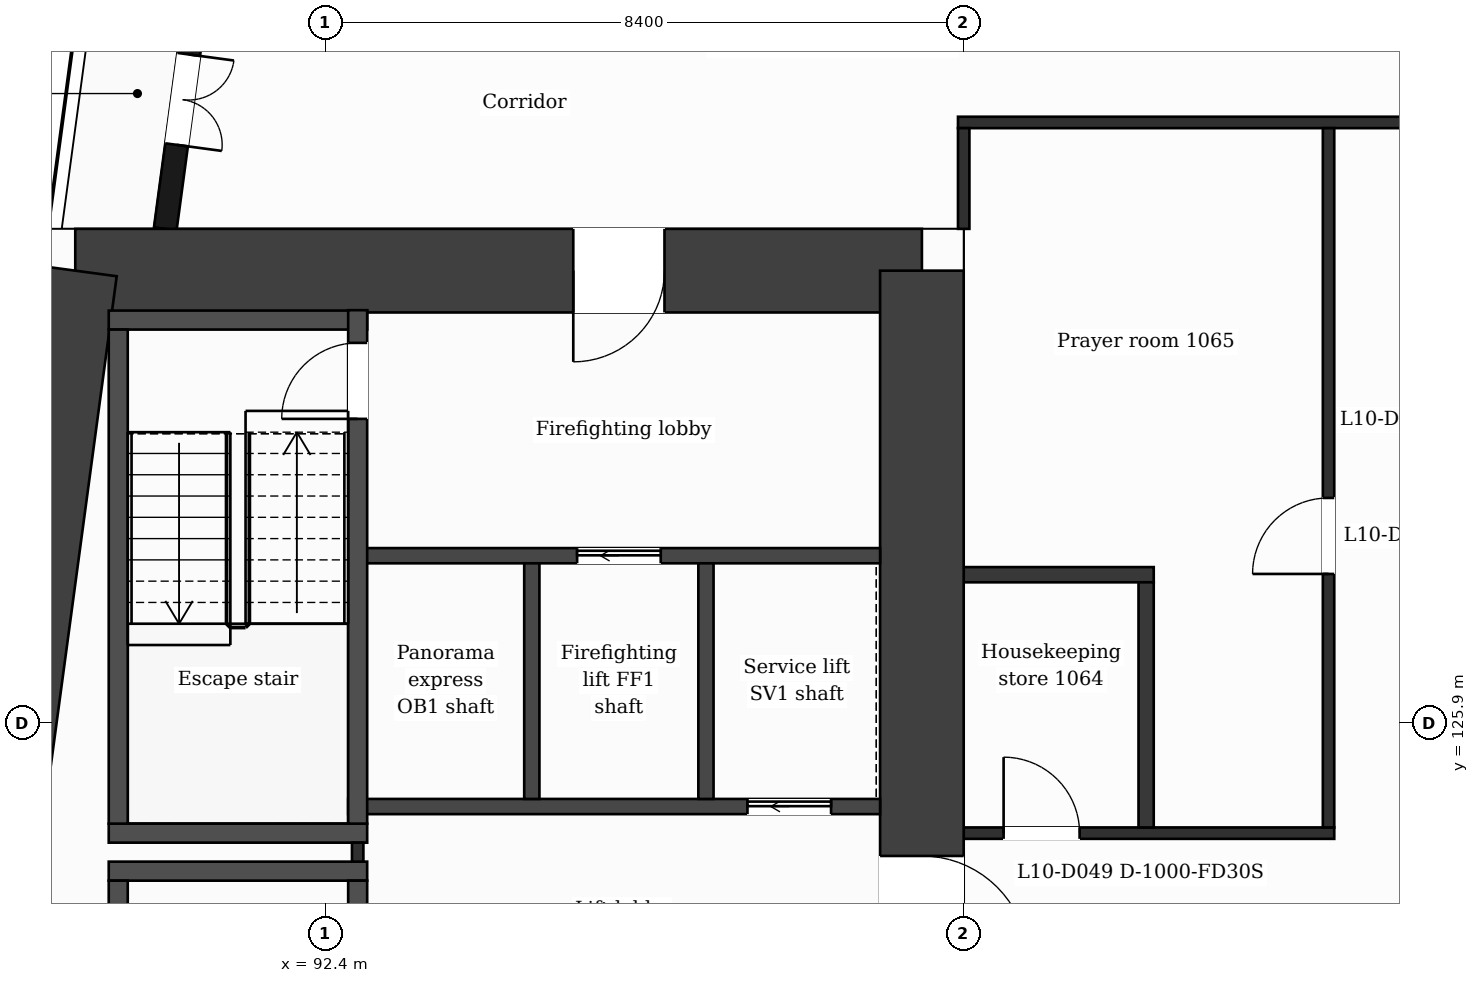
"""IFC4 building model, lengths in metres.
Left out: names, types, materials, properties, quantities, classifications, styles, units other than length and angle.
Written with IfcOpenShell. Run it as: python <this file> out.ifc"""

import sys

from ifc_helpers import new_model, si_unit, direction, frame, frame_2d, origin, place, context, subcontext, project, spatial, rectangle, extrude, element, fill, save


model = new_model("IFC4")
c1 = context("Model", 3, precision=1e-05, world=origin(), true_north=direction((0.0, 1.0)))
c2 = subcontext(c1, "Body", "Model", "MODEL_VIEW")
j1 = project(units=[si_unit("LENGTHUNIT", "METRE"), si_unit("PLANEANGLEUNIT", "RADIAN")], contexts=[c1])
p1 = place(None, origin())
s1 = spatial("IfcSite", under=j1, at=p1, CompositionType="ELEMENT")
p2 = place(p1, origin())
s2 = spatial("IfcBuilding", under=s1, at=p2, CompositionType="ELEMENT")
p3 = place(p2, frame((0.0, 0.0, 53.0)))
s3 = spatial("IfcBuildingStorey", under=s2, at=p3, CompositionType="ELEMENT", Elevation=53.0)
p4 = place(p3, frame((89.112, 131.85, 0.0), z_axis=(0.0, 0.0, 1.0), x_axis=(1.0, 0.0, 0.0)))
e1 = element("IfcWall", 1, at=p4, inside=s3, PredefinedType="SHEAR", context=c2, shape_type="SweptSolid", body=[
    extrude(rectangle(XDim=11.138, YDim=1.1, at=frame_2d((5.569, 0.0))), origin(), (0.0, 0.0, 1.0), 3.5),
])
p5 = place(p4, frame((6.552, 0.0, 0.0)))
e2 = element("IfcOpeningElement", 2, at=p5, cuts=e1, PredefinedType="OPENING", context=c2, shape_type="SweptSolid", body=[
    extrude(rectangle(XDim=1.2, YDim=2.1, at=frame_2d((0.6, 1.05))), frame((0.0, 0.56, 0.0), z_axis=(0.0, -1.0, 0.0), x_axis=(1.0, 0.0, 0.0)), (0.0, 0.0, 1.0), 1.12),
])
p6 = place(p3, frame((100.25, 131.85, 0.0), z_axis=(0.0, 0.0, 1.0), x_axis=(0.0, -1.0, 0.0)))
e3 = element("IfcWall", 3, at=p6, inside=s3, PredefinedType="SHEAR", context=c2, shape_type="SweptSolid", body=[
    extrude(rectangle(XDim=20.9, YDim=1.1, at=frame_2d((10.45, 0.0))), origin(), (0.0, 0.0, 1.0), 3.5),
])
p7 = place(p6, frame((7.7, 0.0, 0.0)))
e4 = element("IfcOpeningElement", 4, at=p7, cuts=e3, PredefinedType="OPENING", context=c2, shape_type="SweptSolid", body=[
    extrude(rectangle(XDim=1.4, YDim=2.1, at=frame_2d((0.7, 1.05))), frame((0.0, 0.56, 0.0), z_axis=(0.0, -1.0, 0.0), x_axis=(1.0, 0.0, 0.0)), (0.0, 0.0, 1.0), 1.12),
])
p8 = place(p3, frame((86.298, 110.95, 0.0), z_axis=(0.0, 0.0, 1.0), x_axis=(0.133400422634, 0.99106222168, 0.0)))
e5 = element("IfcWall", 5, at=p8, inside=s3, PredefinedType="SHEAR", context=c2, shape_type="SweptSolid", body=[
    extrude(rectangle(XDim=21.089, YDim=1.1, at=frame_2d((10.544, 0.0))), origin(), (0.0, 0.0, 1.0), 3.5),
])
p9 = place(p3, frame((91.177, 138.95, 0.0), z_axis=(0.0, 0.0, 1.0), x_axis=(-0.133426664613, -0.991058689065, 0.0)))
e6 = element("IfcWall", 6, at=p9, inside=s3, PredefinedType="SOLIDWALL", context=c2, shape_type="SweptSolid", body=[
    extrude(rectangle(XDim=6.609, YDim=0.3, at=frame_2d((3.305, 0.0))), origin(), (0.0, 0.0, 1.0), 3.18),
])
p10 = place(p9, frame((1.039, 0.0, 0.9)))
e7 = element("IfcOpeningElement", 7, at=p10, cuts=e6, PredefinedType="OPENING", context=c2, shape_type="SweptSolid", body=[
    extrude(rectangle(XDim=1.2, YDim=2.1, at=frame_2d((0.6, 1.05))), frame((0.0, 0.16, 0.0), z_axis=(0.0, -1.0, 0.0), x_axis=(1.0, 0.0, 0.0)), (0.0, 0.0, 1.0), 0.32),
])
p11 = place(p9, frame((4.294, 0.0, 0.0)))
e8 = element("IfcOpeningElement", 8, at=p11, cuts=e6, PredefinedType="OPENING", context=c2, shape_type="SweptSolid", body=[
    extrude(rectangle(XDim=1.2, YDim=2.4, at=frame_2d((0.6, 1.2))), frame((0.0, 0.16, 0.0), z_axis=(0.0, -1.0, 0.0), x_axis=(1.0, 0.0, 0.0)), (0.0, 0.0, 1.0), 0.32),
])
for number, where, z_axis, x_axis in (
    (9, (89.552, 123.95, 0.0), (0.0, 0.0, 1.0), (1.0, 0.0, 0.0)),
    (10, (89.552, 124.45, 0.0), (0.0, 0.0, 1.0), (1.0, 0.0, 0.0)),
):
    element("IfcWall", number, at=place(p3, frame(where, z_axis=z_axis, x_axis=x_axis)), inside=s3, PredefinedType="PARTITIONING", context=c2, shape_type="SweptSolid", body=[
        extrude(rectangle(XDim=3.4, YDim=0.25, at=frame_2d((1.7, 0.0))), origin(), (0.0, 0.0, 1.0), 3.18),
    ])
p12 = place(p3, frame((100.8, 124.45, 0.0), z_axis=(0.0, 0.0, 1.0), x_axis=(1.0, 0.0, 0.0)))
e11 = element("IfcWall", 11, at=p12, inside=s3, PredefinedType="PARTITIONING", context=c2, shape_type="SweptSolid", body=[
    extrude(rectangle(XDim=4.875, YDim=0.15, at=frame_2d((2.438, 0.0))), origin(), (0.0, 0.0, 1.0), 3.18),
])
p13 = place(p12, frame((0.525, 0.0, 0.0)))
e12 = element("IfcOpeningElement", 12, at=p13, cuts=e11, PredefinedType="OPENING", context=c2, shape_type="SweptSolid", body=[
    extrude(rectangle(XDim=1.0, YDim=2.1, at=frame_2d((0.5, 1.05))), frame((0.0, 0.085, 0.0), z_axis=(0.0, -1.0, 0.0), x_axis=(1.0, 0.0, 0.0)), (0.0, 0.0, 1.0), 0.17),
])
p14 = place(p3, frame((92.702, 124.8, 0.0), z_axis=(0.0, 0.0, 1.0), x_axis=(1.0, 0.0, 0.0)))
e13 = element("IfcWall", 13, at=p14, inside=s3, PredefinedType="PARTITIONING", context=c2, shape_type="SweptSolid", body=[
    extrude(rectangle(XDim=6.998, YDim=0.2, at=frame_2d((3.499, 0.0))), origin(), (0.0, 0.0, 1.0), 3.18),
])
p15 = place(p14, frame((5.253, 0.0, 0.0)))
e14 = element("IfcOpeningElement", 14, at=p15, cuts=e13, PredefinedType="OPENING", context=c2, shape_type="SweptSolid", body=[
    extrude(rectangle(XDim=1.1, YDim=2.1, at=frame_2d((0.55, 1.05))), frame((0.0, 0.11, 0.0), z_axis=(0.0, -1.0, 0.0), x_axis=(1.0, 0.0, 0.0)), (0.0, 0.0, 1.0), 0.22),
])
p16 = place(p3, frame((100.8, 127.85, 0.0), z_axis=(0.0, 0.0, 1.0), x_axis=(1.0, 0.0, 0.0)))
e15 = element("IfcWall", 15, at=p16, inside=s3, PredefinedType="PARTITIONING", context=c2, shape_type="SweptSolid", body=[
    extrude(rectangle(XDim=2.5, YDim=0.2, at=frame_2d((1.25, 0.0))), origin(), (0.0, 0.0, 1.0), 3.18),
])
p17 = place(p3, frame((92.827, 128.1, 0.0), z_axis=(0.0, 0.0, 1.0), x_axis=(1.0, 0.0, 0.0)))
e16 = element("IfcWall", 16, at=p17, inside=s3, PredefinedType="PARTITIONING", context=c2, shape_type="SweptSolid", body=[
    extrude(rectangle(XDim=6.873, YDim=0.2, at=frame_2d((3.437, 0.0))), origin(), (0.0, 0.0, 1.0), 3.18),
])
p18 = place(p17, frame((2.887, 0.0, 0.0)))
e17 = element("IfcOpeningElement", 17, at=p18, cuts=e16, PredefinedType="OPENING", context=c2, shape_type="SweptSolid", body=[
    extrude(rectangle(XDim=1.1, YDim=2.1, at=frame_2d((0.55, 1.05))), frame((0.0, 0.11, 0.0), z_axis=(0.0, -1.0, 0.0), x_axis=(1.0, 0.0, 0.0)), (0.0, 0.0, 1.0), 0.22),
])
p19 = place(p3, frame((89.552, 131.2, 0.0), z_axis=(0.0, 0.0, 1.0), x_axis=(1.0, 0.0, 0.0)))
e18 = element("IfcWall", 18, at=p19, inside=s3, PredefinedType="PARTITIONING", context=c2, shape_type="SweptSolid", body=[
    extrude(rectangle(XDim=3.4, YDim=0.25, at=frame_2d((1.7, 0.0))), origin(), (0.0, 0.0, 1.0), 3.18),
])
p20 = place(p3, frame((100.725, 133.8, 0.0), z_axis=(0.0, 0.0, 1.0), x_axis=(1.0, 0.0, 0.0)))
e19 = element("IfcWall", 19, at=p20, inside=s3, PredefinedType="PARTITIONING", context=c2, shape_type="SweptSolid", body=[
    extrude(rectangle(XDim=25.35, YDim=0.15, at=frame_2d((12.675, 0.0))), origin(), (0.0, 0.0, 1.0), 3.18),
])
p21 = place(p3, frame((89.677, 117.07, 0.0), z_axis=(0.0, 0.0, 1.0), x_axis=(0.0, 1.0, 0.0)))
e20 = element("IfcWall", 20, at=p21, inside=s3, PredefinedType="PARTITIONING", context=c2, shape_type="SweptSolid", body=[
    extrude(rectangle(XDim=6.755, YDim=0.25, at=frame_2d((3.377, 0.0))), origin(), (0.0, 0.0, 1.0), 3.18),
])
p22 = place(p3, frame((89.677, 124.575, 0.0), z_axis=(0.0, 0.0, 1.0), x_axis=(0.0, 1.0, 0.0)))
e21 = element("IfcWall", 21, at=p22, inside=s3, PredefinedType="PARTITIONING", context=c2, shape_type="SweptSolid", body=[
    extrude(rectangle(XDim=6.5, YDim=0.25, at=frame_2d((3.25, 0.0))), origin(), (0.0, 0.0, 1.0), 3.18),
])
p23 = place(p3, frame((92.827, 124.075, 0.0), z_axis=(0.0, 0.0, 1.0), x_axis=(0.0, 1.0, 0.0)))
e22 = element("IfcWall", 22, at=p23, inside=s3, PredefinedType="PARTITIONING", context=c2, shape_type="SweptSolid", body=[
    extrude(rectangle(XDim=0.25, YDim=0.15, at=frame_2d((0.125, 0.0))), origin(), (0.0, 0.0, 1.0), 3.18),
])
p24 = place(p3, frame((92.827, 117.07, 0.0), z_axis=(0.0, 0.0, 1.0), x_axis=(0.0, 1.0, 0.0)))
e23 = element("IfcWall", 23, at=p24, inside=s3, PredefinedType="PARTITIONING", context=c2, shape_type="SweptSolid", body=[
    extrude(rectangle(XDim=6.755, YDim=0.25, at=frame_2d((3.377, 0.0))), origin(), (0.0, 0.0, 1.0), 3.18),
])
p25 = place(p24, frame((5.455, 0.0, 0.0)))
e24 = element("IfcOpeningElement", 24, at=p25, cuts=e23, PredefinedType="OPENING", context=c2, shape_type="SweptSolid", body=[
    extrude(rectangle(XDim=0.95, YDim=2.1, at=frame_2d((0.475, 1.05))), frame((0.0, 0.135, 0.0), z_axis=(0.0, -1.0, 0.0), x_axis=(1.0, 0.0, 0.0)), (0.0, 0.0, 1.0), 0.27),
])
p26 = place(p3, frame((92.827, 124.575, 0.0), z_axis=(0.0, 0.0, 1.0), x_axis=(0.0, 1.0, 0.0)))
e25 = element("IfcWall", 25, at=p26, inside=s3, PredefinedType="PARTITIONING", context=c2, shape_type="SweptSolid", body=[
    extrude(rectangle(XDim=6.755, YDim=0.25, at=frame_2d((3.377, 0.0))), origin(), (0.0, 0.0, 1.0), 3.18),
])
p27 = place(p26, frame((5.325, 0.0, 0.0)))
e26 = element("IfcOpeningElement", 26, at=p27, cuts=e25, PredefinedType="OPENING", context=c2, shape_type="SweptSolid", body=[
    extrude(rectangle(XDim=1.0, YDim=2.1, at=frame_2d((0.5, 1.05))), frame((0.0, 0.135, 0.0), z_axis=(0.0, -1.0, 0.0), x_axis=(1.0, 0.0, 0.0)), (0.0, 0.0, 1.0), 0.27),
])
for number, where, z_axis, x_axis in (
    (27, (95.118, 124.9, 0.0), (0.0, 0.0, 1.0), (0.0, 1.0, 0.0)),
    (28, (97.409, 124.9, 0.0), (0.0, 0.0, 1.0), (0.0, 1.0, 0.0)),
):
    element("IfcWall", number, at=place(p3, frame(where, z_axis=z_axis, x_axis=x_axis)), inside=s3, PredefinedType="PARTITIONING", context=c2, shape_type="SweptSolid", body=[
        extrude(rectangle(XDim=3.1, YDim=0.2, at=frame_2d((1.55, 0.0))), origin(), (0.0, 0.0, 1.0), 3.18),
    ])
p28 = place(p3, frame((100.8, 132.4, 0.0), z_axis=(0.0, 0.0, 1.0), x_axis=(0.0, 1.0, 0.0)))
e29 = element("IfcWall", 29, at=p28, inside=s3, PredefinedType="PARTITIONING", context=c2, shape_type="SweptSolid", body=[
    extrude(rectangle(XDim=1.325, YDim=0.15, at=frame_2d((0.663, 0.0))), origin(), (0.0, 0.0, 1.0), 3.18),
])
p29 = place(p3, frame((103.2, 124.525, 0.0), z_axis=(0.0, 0.0, 1.0), x_axis=(0.0, 1.0, 0.0)))
e30 = element("IfcWall", 30, at=p29, inside=s3, PredefinedType="PARTITIONING", context=c2, shape_type="SweptSolid", body=[
    extrude(rectangle(XDim=3.225, YDim=0.2, at=frame_2d((1.613, 0.0))), origin(), (0.0, 0.0, 1.0), 3.18),
])
p30 = place(p3, frame((105.6, 124.525, 0.0), z_axis=(0.0, 0.0, 1.0), x_axis=(0.0, 1.0, 0.0)))
e31 = element("IfcWall", 31, at=p30, inside=s3, PredefinedType="PARTITIONING", context=c2, shape_type="SweptSolid", body=[
    extrude(rectangle(XDim=9.2, YDim=0.15, at=frame_2d((4.6, 0.0))), origin(), (0.0, 0.0, 1.0), 3.18),
])
p31 = place(p30, frame((3.335, 0.0, 0.0)))
e32 = element("IfcOpeningElement", 32, at=p31, cuts=e31, PredefinedType="OPENING", context=c2, shape_type="SweptSolid", body=[
    extrude(rectangle(XDim=1.0, YDim=2.1, at=frame_2d((0.5, 1.05))), frame((0.0, 0.085, 0.0), z_axis=(0.0, -1.0, 0.0), x_axis=(1.0, 0.0, 0.0)), (0.0, 0.0, 1.0), 0.17),
])
p32 = place(p11, origin())
e33 = element("IfcDoor", 33, at=p32, inside=s3, OperationType="DOUBLE_DOOR_SINGLE_SWING", PredefinedType="DOOR", context=c2, shape_type="SweptSolid", body=[
    extrude(rectangle(XDim=1.2, YDim=2.4, at=frame_2d((0.6, 1.2))), frame((0.0, 0.025, 0.0), z_axis=(0.0, -1.0, 0.0), x_axis=(1.0, 0.0, 0.0)), (0.0, 0.0, 1.0), 0.05),
])
fill(e8, e33)
p33 = place(p18, origin())
e34 = element("IfcDoor", 34, at=p33, inside=s3, OperationType="SLIDING_TO_LEFT", PredefinedType="DOOR", context=c2, shape_type="SweptSolid", body=[
    extrude(rectangle(XDim=1.1, YDim=2.1, at=frame_2d((0.55, 1.05))), frame((0.0, 0.025, 0.0), z_axis=(0.0, -1.0, 0.0), x_axis=(1.0, 0.0, 0.0)), (0.0, 0.0, 1.0), 0.05),
])
fill(e17, e34)
p34 = place(p15, origin())
e35 = element("IfcDoor", 35, at=p34, inside=s3, OperationType="SLIDING_TO_LEFT", PredefinedType="DOOR", context=c2, shape_type="SweptSolid", body=[
    extrude(rectangle(XDim=1.1, YDim=2.1, at=frame_2d((0.55, 1.05))), frame((0.0, 0.025, 0.0), z_axis=(0.0, -1.0, 0.0), x_axis=(1.0, 0.0, 0.0)), (0.0, 0.0, 1.0), 0.05),
])
fill(e14, e35)
p35 = place(p27, origin())
e36 = element("IfcDoor", 36, at=p35, inside=s3, OperationType="SINGLE_SWING_LEFT", PredefinedType="DOOR", context=c2, shape_type="SweptSolid", body=[
    extrude(rectangle(XDim=1.0, YDim=2.1, at=frame_2d((0.5, 1.05))), frame((0.0, 0.025, 0.0), z_axis=(0.0, -1.0, 0.0), x_axis=(1.0, 0.0, 0.0)), (0.0, 0.0, 1.0), 0.05),
])
fill(e26, e36)
p36 = place(p31, origin())
e37 = element("IfcDoor", 37, at=p36, inside=s3, OperationType="SINGLE_SWING_LEFT", PredefinedType="DOOR", context=c2, shape_type="SweptSolid", body=[
    extrude(rectangle(XDim=1.0, YDim=2.1, at=frame_2d((0.5, 1.05))), frame((0.0, 0.025, 0.0), z_axis=(0.0, -1.0, 0.0), x_axis=(1.0, 0.0, 0.0)), (0.0, 0.0, 1.0), 0.05),
])
fill(e32, e37)
p37 = place(p13, origin())
e38 = element("IfcDoor", 38, at=p37, inside=s3, OperationType="SINGLE_SWING_LEFT", PredefinedType="DOOR", context=c2, shape_type="SweptSolid", body=[
    extrude(rectangle(XDim=1.0, YDim=2.1, at=frame_2d((0.5, 1.05))), frame((0.0, 0.025, 0.0), z_axis=(0.0, -1.0, 0.0), x_axis=(1.0, 0.0, 0.0)), (0.0, 0.0, 1.0), 0.05),
])
fill(e12, e38)
p38 = place(p5, origin())
e39 = element("IfcDoor", 39, at=p38, inside=s3, OperationType="SINGLE_SWING_LEFT", PredefinedType="DOOR", context=c2, shape_type="SweptSolid", body=[
    extrude(rectangle(XDim=1.2, YDim=2.1, at=frame_2d((0.6, 1.05))), frame((0.0, 0.025, 0.0), z_axis=(0.0, -1.0, 0.0), x_axis=(1.0, 0.0, 0.0)), (0.0, 0.0, 1.0), 0.05),
])
fill(e2, e39)
p39 = place(p7, origin())
e40 = element("IfcDoor", 40, at=p39, inside=s3, OperationType="SINGLE_SWING_RIGHT", PredefinedType="DOOR", context=c2, shape_type="SweptSolid", body=[
    extrude(rectangle(XDim=1.4, YDim=2.1, at=frame_2d((0.7, 1.05))), frame((0.0, 0.025, 0.0), z_axis=(0.0, -1.0, 0.0), x_axis=(1.0, 0.0, 0.0)), (0.0, 0.0, 1.0), 0.05),
])
fill(e4, e40)
save(model, sys.argv[1])
